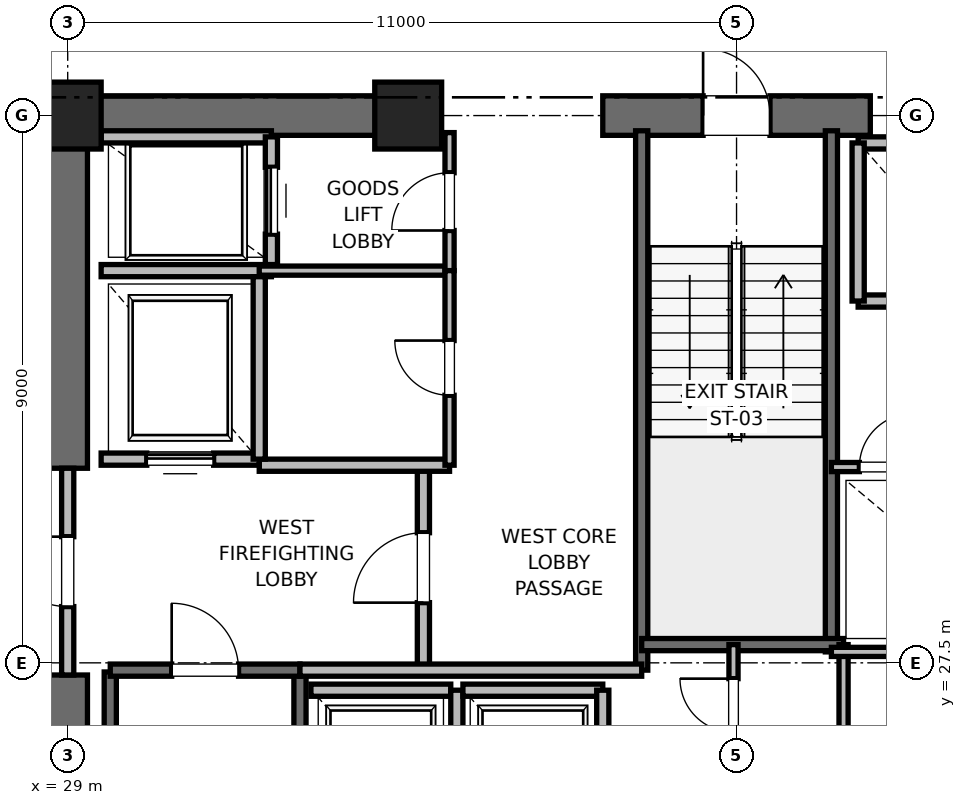
"""IFC4 building model, lengths in metres.
Left out: names, types, materials, properties, quantities, classifications, styles, units other than length and angle.
Written with IfcOpenShell. Run it as: python <this file> out.ifc"""

import sys

from ifc_helpers import new_model, si_unit, direction, frame, frame_2d, origin, origin_2d, place, context, subcontext, project, spatial, rectangle, extrude, element, fill, save


model = new_model("IFC4")
c1 = context("Model", 3, precision=1e-05, world=origin(), true_north=direction((0.0, 1.0)))
c2 = subcontext(c1, "Body", "Model", "MODEL_VIEW")
j1 = project(units=[si_unit("LENGTHUNIT", "METRE"), si_unit("PLANEANGLEUNIT", "RADIAN")], contexts=[c1])
p1 = place(None, origin())
s1 = spatial("IfcSite", under=j1, at=p1, CompositionType="ELEMENT")
p2 = place(p1, origin())
s2 = spatial("IfcBuilding", under=s1, at=p2, CompositionType="ELEMENT")
p3 = place(p2, frame((0.0, 0.0, 47.6)))
s3 = spatial("IfcBuildingStorey", under=s2, at=p3, CompositionType="ELEMENT", Elevation=47.6)
for number, where, z_axis, x_axis in (
    (1, (29.0, 36.5, 0.0), (0.0, 0.0, 1.0), (1.0, 0.0, 0.0)),
    (2, (34.6, 36.5, 0.0), (0.0, 0.0, 1.0), (1.0, 0.0, 0.0)),
):
    element("IfcColumn", number, at=place(p3, frame(where, z_axis=z_axis, x_axis=x_axis)), inside=s3, PredefinedType="PILASTER", context=c2, shape_type="SweptSolid", body=[
        extrude(rectangle(XDim=1.1, YDim=1.1, at=origin_2d()), origin(), (0.0, 0.0, 1.0), 4.0),
    ])
p4 = place(p3, frame((29.0, 36.5, 0.0), z_axis=(0.0, 0.0, 1.0), x_axis=(1.0, 0.0, 0.0)))
e3 = element("IfcWall", 3, at=p4, inside=s3, PredefinedType="SHEAR", context=c2, shape_type="SweptSolid", body=[
    extrude(rectangle(XDim=5.8, YDim=0.65, at=frame_2d((2.9, 0.0))), origin(), (0.0, 0.0, 1.0), 3.76),
])
p5 = place(p3, frame((37.8, 36.5, 0.0), z_axis=(0.0, 0.0, 1.0), x_axis=(1.0, 0.0, 0.0)))
e4 = element("IfcWall", 4, at=p5, inside=s3, PredefinedType="SHEAR", context=c2, shape_type="SweptSolid", body=[
    extrude(rectangle(XDim=4.4, YDim=0.65, at=frame_2d((2.2, 0.0))), origin(), (0.0, 0.0, 1.0), 3.76),
])
p6 = place(p5, frame((1.65, 0.0, 0.0)))
e5 = element("IfcOpeningElement", 5, at=p6, cuts=e4, PredefinedType="OPENING", context=c2, shape_type="SweptSolid", body=[
    extrude(rectangle(XDim=1.1, YDim=2.15, at=frame_2d((0.55, 1.075))), frame((0.0, 0.325, 0.0), z_axis=(0.0, -1.0, 0.0), x_axis=(1.0, 0.0, 0.0)), (0.0, 0.0, 1.0), 0.65),
])
p7 = place(p3, frame((29.0, 18.5, 0.0), z_axis=(0.0, 0.0, 1.0), x_axis=(0.0, 1.0, 0.0)))
e6 = element("IfcWall", 6, at=p7, inside=s3, PredefinedType="SHEAR", context=c2, shape_type="SweptSolid", body=[
    extrude(rectangle(XDim=8.8, YDim=0.65, at=frame_2d((4.4, 0.0))), origin(), (0.0, 0.0, 1.0), 3.76),
])
p8 = place(p3, frame((29.0, 30.7, 0.0), z_axis=(0.0, 0.0, 1.0), x_axis=(0.0, 1.0, 0.0)))
e7 = element("IfcWall", 7, at=p8, inside=s3, PredefinedType="SHEAR", context=c2, shape_type="SweptSolid", body=[
    extrude(rectangle(XDim=5.8, YDim=0.65, at=frame_2d((2.9, 0.0))), origin(), (0.0, 0.0, 1.0), 3.76),
])
p9 = place(p3, frame((29.7, 19.2, 0.0), z_axis=(0.0, 0.0, 1.0), x_axis=(0.0, 1.0, 0.0)))
e8 = element("IfcWall", 8, at=p9, inside=s3, PredefinedType="SOLIDWALL", context=c2, shape_type="SweptSolid", body=[
    extrude(rectangle(XDim=8.15, YDim=0.2, at=frame_2d((4.075, 0.0))), origin(), (0.0, 0.0, 1.0), 3.76),
])
p10 = place(p3, frame((32.82, 18.6, 0.0), z_axis=(0.0, 0.0, 1.0), x_axis=(0.0, 1.0, 0.0)))
e9 = element("IfcWall", 9, at=p10, inside=s3, PredefinedType="SOLIDWALL", context=c2, shape_type="SweptSolid", body=[
    extrude(rectangle(XDim=8.78, YDim=0.2, at=frame_2d((4.39, 0.0))), origin(), (0.0, 0.0, 1.0), 3.76),
])
p11 = place(p3, frame((29.7, 27.38, 0.0), z_axis=(0.0, 0.0, 1.0), x_axis=(1.0, 0.0, 0.0)))
e10 = element("IfcWall", 10, at=p11, inside=s3, PredefinedType="SOLIDWALL", context=c2, shape_type="SweptSolid", body=[
    extrude(rectangle(XDim=3.12, YDim=0.2, at=frame_2d((1.56, 0.0))), origin(), (0.0, 0.0, 1.0), 3.76),
])
p12 = place(p11, frame((1.01, 0.0, 0.0)))
e11 = element("IfcOpeningElement", 11, at=p12, cuts=e10, PredefinedType="OPENING", context=c2, shape_type="SweptSolid", body=[
    extrude(rectangle(XDim=1.1, YDim=2.15, at=frame_2d((0.55, 1.075))), frame((0.0, 0.1, 0.0), z_axis=(0.0, -1.0, 0.0), x_axis=(1.0, 0.0, 0.0)), (0.0, 0.0, 1.0), 0.2),
])
p13 = place(p3, frame((38.44, 27.38, 0.0), z_axis=(0.0, 0.0, 1.0), x_axis=(0.0, 1.0, 0.0)))
e12 = element("IfcWall", 12, at=p13, inside=s3, PredefinedType="SOLIDWALL", context=c2, shape_type="SweptSolid", body=[
    extrude(rectangle(XDim=8.87, YDim=0.2, at=frame_2d((4.435, 0.0))), origin(), (0.0, 0.0, 1.0), 3.76),
])
p14 = place(p3, frame((41.56, 27.68, 0.0), z_axis=(0.0, 0.0, 1.0), x_axis=(0.0, 1.0, 0.0)))
e13 = element("IfcWall", 13, at=p14, inside=s3, PredefinedType="SOLIDWALL", context=c2, shape_type="SweptSolid", body=[
    extrude(rectangle(XDim=8.57, YDim=0.2, at=frame_2d((4.285, 0.0))), origin(), (0.0, 0.0, 1.0), 3.76),
])
p15 = place(p3, frame((38.44, 27.8, 0.0), z_axis=(0.0, 0.0, 1.0), x_axis=(1.0, 0.0, 0.0)))
e14 = element("IfcWall", 14, at=p15, inside=s3, PredefinedType="SOLIDWALL", context=c2, shape_type="SweptSolid", body=[
    extrude(rectangle(XDim=3.32, YDim=0.2, at=frame_2d((1.66, 0.0))), origin(), (0.0, 0.0, 1.0), 3.76),
])
p16 = place(p3, frame((34.85, 27.38, 0.0), z_axis=(0.0, 0.0, 1.0), x_axis=(0.0, 1.0, 0.0)))
e15 = element("IfcWall", 15, at=p16, inside=s3, PredefinedType="PARTITIONING", context=c2, shape_type="SweptSolid", body=[
    extrude(rectangle(XDim=3.37, YDim=0.2, at=frame_2d((1.685, 0.0))), origin(), (0.0, 0.0, 1.0), 3.76),
])
p17 = place(p16, frame((1.11, 0.0, 0.0)))
e16 = element("IfcOpeningElement", 16, at=p17, cuts=e15, PredefinedType="OPENING", context=c2, shape_type="SweptSolid", body=[
    extrude(rectangle(XDim=1.15, YDim=2.2, at=frame_2d((0.575, 1.1))), frame((0.0, 0.1, 0.0), z_axis=(0.0, -1.0, 0.0), x_axis=(1.0, 0.0, 0.0)), (0.0, 0.0, 1.0), 0.2),
])
p18 = place(p3, frame((29.0, 27.3, 0.0), z_axis=(0.0, 0.0, 1.0), x_axis=(0.0, 1.0, 0.0)))
e17 = element("IfcWall", 17, at=p18, inside=s3, PredefinedType="PARTITIONING", context=c2, shape_type="SweptSolid", body=[
    extrude(rectangle(XDim=3.4, YDim=0.2, at=frame_2d((1.7, 0.0))), origin(), (0.0, 0.0, 1.0), 2.54),
])
p19 = place(p18, frame((1.125, 0.0, 0.0)))
e18 = element("IfcOpeningElement", 18, at=p19, cuts=e17, PredefinedType="OPENING", context=c2, shape_type="SweptSolid", body=[
    extrude(rectangle(XDim=1.15, YDim=2.2, at=frame_2d((0.575, 1.1))), frame((0.0, 0.1, 0.0), z_axis=(0.0, -1.0, 0.0), x_axis=(1.0, 0.0, 0.0)), (0.0, 0.0, 1.0), 0.2),
])
p20 = place(p3, frame((32.82, 27.38, 0.0), z_axis=(0.0, 0.0, 1.0), x_axis=(1.0, 0.0, 0.0)))
e19 = element("IfcWall", 19, at=p20, inside=s3, PredefinedType="PARTITIONING", context=c2, shape_type="SweptSolid", body=[
    extrude(rectangle(XDim=5.62, YDim=0.2, at=frame_2d((2.81, 0.0))), origin(), (0.0, 0.0, 1.0), 3.76),
])
p21 = place(p3, frame((32.15, 30.75, 0.0), z_axis=(0.0, 0.0, 1.0), x_axis=(1.0, 0.0, 0.0)))
e20 = element("IfcWall", 20, at=p21, inside=s3, PredefinedType="PARTITIONING", context=c2, shape_type="SweptSolid", body=[
    extrude(rectangle(XDim=3.13, YDim=0.2, at=frame_2d((1.565, 0.0))), origin(), (0.0, 0.0, 1.0), 3.76),
])
p22 = place(p3, frame((29.55, 30.85, 0.0), z_axis=(0.0, 0.0, 1.0), x_axis=(1.0, 0.0, 0.0)))
e21 = element("IfcWall", 21, at=p22, inside=s3, PredefinedType="SOLIDWALL", context=c2, shape_type="SweptSolid", body=[
    extrude(rectangle(XDim=2.6, YDim=0.2, at=frame_2d((1.3, 0.0))), origin(), (0.0, 0.0, 1.0), 2.54),
])
p23 = place(p22, frame((0.75, 0.0, 0.0)))
e22 = element("IfcOpeningElement", 22, at=p23, cuts=e21, PredefinedType="OPENING", context=c2, shape_type="SweptSolid", body=[
    extrude(rectangle(XDim=1.1, YDim=2.2, at=frame_2d((0.55, 1.1))), frame((0.0, 0.1, 0.0), z_axis=(0.0, -1.0, 0.0), x_axis=(1.0, 0.0, 0.0)), (0.0, 0.0, 1.0), 0.2),
])
p24 = place(p3, frame((29.55, 33.95, 0.0), z_axis=(0.0, 0.0, 1.0), x_axis=(1.0, 0.0, 0.0)))
e23 = element("IfcWall", 23, at=p24, inside=s3, PredefinedType="SOLIDWALL", context=c2, shape_type="SweptSolid", body=[
    extrude(rectangle(XDim=2.8, YDim=0.2, at=frame_2d((1.4, 0.0))), origin(), (0.0, 0.0, 1.0), 3.76),
])
p25 = place(p3, frame((32.15, 30.85, 0.0), z_axis=(0.0, 0.0, 1.0), x_axis=(0.0, 1.0, 0.0)))
e24 = element("IfcWall", 24, at=p25, inside=s3, PredefinedType="SOLIDWALL", context=c2, shape_type="SweptSolid", body=[
    extrude(rectangle(XDim=3.0, YDim=0.2, at=frame_2d((1.5, 0.0))), origin(), (0.0, 0.0, 1.0), 3.76),
])
p26 = place(p3, frame((32.35, 36.15, 0.0), z_axis=(0.0, 0.0, 1.0), x_axis=(-1.0, 0.0, 0.0)))
e25 = element("IfcWall", 25, at=p26, inside=s3, PredefinedType="SOLIDWALL", context=c2, shape_type="SweptSolid", body=[
    extrude(rectangle(XDim=2.8, YDim=0.2, at=frame_2d((1.4, 0.0))), origin(), (0.0, 0.0, 1.0), 2.889),
])
p27 = place(p3, frame((32.35, 34.05, 0.0), z_axis=(0.0, 0.0, 1.0), x_axis=(0.0, 1.0, 0.0)))
e26 = element("IfcWall", 26, at=p27, inside=s3, PredefinedType="SOLIDWALL", context=c2, shape_type="SweptSolid", body=[
    extrude(rectangle(XDim=2.1, YDim=0.2, at=frame_2d((1.05, 0.0))), origin(), (0.0, 0.0, 1.0), 3.76),
])
p28 = place(p27, frame((0.5, 0.0, 0.0)))
e27 = element("IfcOpeningElement", 27, at=p28, cuts=e26, PredefinedType="OPENING", context=c2, shape_type="SweptSolid", body=[
    extrude(rectangle(XDim=1.1, YDim=2.2, at=frame_2d((0.55, 1.1))), frame((0.0, 0.1, 0.0), z_axis=(0.0, -1.0, 0.0), x_axis=(1.0, 0.0, 0.0)), (0.0, 0.0, 1.0), 0.2),
])
p29 = place(p3, frame((35.3, 27.05, 0.0), z_axis=(0.0, 0.0, 1.0), x_axis=(-1.0, 0.0, 0.0)))
e28 = element("IfcWall", 28, at=p29, inside=s3, PredefinedType="SOLIDWALL", context=c2, shape_type="SweptSolid", body=[
    extrude(rectangle(XDim=2.3, YDim=0.2, at=frame_2d((1.15, 0.0))), origin(), (0.0, 0.0, 1.0), 3.76),
])
p30 = place(p3, frame((35.4, 24.45, 0.0), z_axis=(0.0, 0.0, 1.0), x_axis=(0.0, 1.0, 0.0)))
e29 = element("IfcWall", 29, at=p30, inside=s3, PredefinedType="SOLIDWALL", context=c2, shape_type="SweptSolid", body=[
    extrude(rectangle(XDim=2.6, YDim=0.2, at=frame_2d((1.3, 0.0))), origin(), (0.0, 0.0, 1.0), 3.76),
])
p31 = place(p3, frame((37.8, 27.05, 0.0), z_axis=(0.0, 0.0, 1.0), x_axis=(-1.0, 0.0, 0.0)))
e30 = element("IfcWall", 30, at=p31, inside=s3, PredefinedType="SOLIDWALL", context=c2, shape_type="SweptSolid", body=[
    extrude(rectangle(XDim=2.3, YDim=0.2, at=frame_2d((1.15, 0.0))), origin(), (0.0, 0.0, 1.0), 3.76),
])
p32 = place(p3, frame((37.8, 24.45, 0.0), z_axis=(0.0, 0.0, 1.0), x_axis=(0.0, 1.0, 0.0)))
e31 = element("IfcWall", 31, at=p32, inside=s3, PredefinedType="SOLIDWALL", context=c2, shape_type="SweptSolid", body=[
    extrude(rectangle(XDim=2.6, YDim=0.2, at=frame_2d((1.3, 0.0))), origin(), (0.0, 0.0, 1.0), 3.76),
])
p33 = place(p3, frame((42.0, 33.45, 0.0), z_axis=(0.0, 0.0, 1.0), x_axis=(1.0, 0.0, 0.0)))
e32 = element("IfcWall", 32, at=p33, inside=s3, PredefinedType="SOLIDWALL", context=c2, shape_type="SweptSolid", body=[
    extrude(rectangle(XDim=2.3, YDim=0.2, at=frame_2d((1.15, 0.0))), origin(), (0.0, 0.0, 1.0), 3.76),
])
p34 = place(p3, frame((44.3, 36.05, 0.0), z_axis=(0.0, 0.0, 1.0), x_axis=(-1.0, 0.0, 0.0)))
e33 = element("IfcWall", 33, at=p34, inside=s3, PredefinedType="SOLIDWALL", context=c2, shape_type="SweptSolid", body=[
    extrude(rectangle(XDim=2.3, YDim=0.2, at=frame_2d((1.15, 0.0))), origin(), (0.0, 0.0, 1.0), 2.54),
])
p35 = place(p3, frame((42.0, 36.05, 0.0), z_axis=(0.0, 0.0, 1.0), x_axis=(0.0, -1.0, 0.0)))
e34 = element("IfcWall", 34, at=p35, inside=s3, PredefinedType="SOLIDWALL", context=c2, shape_type="SweptSolid", body=[
    extrude(rectangle(XDim=2.6, YDim=0.2, at=frame_2d((1.3, 0.0))), origin(), (0.0, 0.0, 1.0), 2.54),
])
p36 = place(p3, frame((41.76, 23.8, 0.0), z_axis=(0.0, 0.0, 1.0), x_axis=(0.0, 1.0, 0.0)))
e35 = element("IfcWall", 35, at=p36, inside=s3, PredefinedType="PARTITIONING", context=c2, shape_type="SweptSolid", body=[
    extrude(rectangle(XDim=4.0, YDim=0.15, at=frame_2d((2.0, 0.0))), origin(), (0.0, 0.0, 1.0), 2.85),
])
p37 = place(p3, frame((39.95, 25.8, 0.0), z_axis=(0.0, 0.0, 1.0), x_axis=(0.0, 1.0, 0.0)))
e36 = element("IfcWall", 36, at=p37, inside=s3, PredefinedType="PARTITIONING", context=c2, shape_type="SweptSolid", body=[
    extrude(rectangle(XDim=2.0, YDim=0.15, at=frame_2d((1.0, 0.0))), origin(), (0.0, 0.0, 1.0), 2.85),
])
p38 = place(p37, frame((0.56, 0.0, 0.0)))
e37 = element("IfcOpeningElement", 37, at=p38, cuts=e36, PredefinedType="OPENING", context=c2, shape_type="SweptSolid", body=[
    extrude(rectangle(XDim=0.88, YDim=2.1, at=frame_2d((0.44, 1.05))), frame((0.0, 0.075, 0.0), z_axis=(0.0, -1.0, 0.0), x_axis=(1.0, 0.0, 0.0)), (0.0, 0.0, 1.0), 0.15),
])
p39 = place(p3, frame((32.15, 33.95, 0.0), z_axis=(0.0, 0.0, 1.0), x_axis=(1.0, 0.0, 0.0)))
e38 = element("IfcWall", 38, at=p39, inside=s3, PredefinedType="PARTITIONING", context=c2, shape_type="SweptSolid", body=[
    extrude(rectangle(XDim=3.13, YDim=0.15, at=frame_2d((1.565, 0.0))), origin(), (0.0, 0.0, 1.0), 2.85),
])
p40 = place(p3, frame((35.28, 33.95, 0.0), z_axis=(0.0, 0.0, 1.0), x_axis=(0.0, 1.0, 0.0)))
e39 = element("IfcWall", 39, at=p40, inside=s3, PredefinedType="PARTITIONING", context=c2, shape_type="SweptSolid", body=[
    extrude(rectangle(XDim=2.27, YDim=0.15, at=frame_2d((1.135, 0.0))), origin(), (0.0, 0.0, 1.0), 2.54),
])
p41 = place(p40, frame((0.66, 0.0, 0.0)))
e40 = element("IfcOpeningElement", 40, at=p41, cuts=e39, PredefinedType="OPENING", context=c2, shape_type="SweptSolid", body=[
    extrude(rectangle(XDim=0.95, YDim=2.15, at=frame_2d((0.475, 1.075))), frame((0.0, 0.075, 0.0), z_axis=(0.0, -1.0, 0.0), x_axis=(1.0, 0.0, 0.0)), (0.0, 0.0, 1.0), 0.15),
])
p42 = place(p3, frame((35.28, 30.75, 0.0), z_axis=(0.0, 0.0, 1.0), x_axis=(0.0, 1.0, 0.0)))
e41 = element("IfcWall", 41, at=p42, inside=s3, PredefinedType="PARTITIONING", context=c2, shape_type="SweptSolid", body=[
    extrude(rectangle(XDim=3.2, YDim=0.15, at=frame_2d((1.6, 0.0))), origin(), (0.0, 0.0, 1.0), 2.85),
])
p43 = place(p42, frame((1.15, 0.0, 0.0)))
e42 = element("IfcOpeningElement", 42, at=p43, cuts=e41, PredefinedType="OPENING", context=c2, shape_type="SweptSolid", body=[
    extrude(rectangle(XDim=0.9, YDim=2.1, at=frame_2d((0.45, 1.05))), frame((0.0, 0.075, 0.0), z_axis=(0.0, -1.0, 0.0), x_axis=(1.0, 0.0, 0.0)), (0.0, 0.0, 1.0), 0.15),
])
p44 = place(p3, frame((41.56, 27.68, 0.0), z_axis=(0.0, 0.0, 1.0), x_axis=(1.0, 0.0, 0.0)))
e43 = element("IfcWall", 43, at=p44, inside=s3, PredefinedType="PARTITIONING", context=c2, shape_type="SweptSolid", body=[
    extrude(rectangle(XDim=3.59, YDim=0.15, at=frame_2d((1.795, 0.0))), origin(), (0.0, 0.0, 1.0), 2.85),
])
p45 = place(p3, frame((41.56, 30.72, 0.0), z_axis=(0.0, 0.0, 1.0), x_axis=(1.0, 0.0, 0.0)))
e44 = element("IfcWall", 44, at=p45, inside=s3, PredefinedType="PARTITIONING", context=c2, shape_type="SweptSolid", body=[
    extrude(rectangle(XDim=1.8, YDim=0.15, at=frame_2d((0.9, 0.0))), origin(), (0.0, 0.0, 1.0), 2.85),
])
p46 = place(p45, frame((0.46, 0.0, 0.0)))
e45 = element("IfcOpeningElement", 45, at=p46, cuts=e44, PredefinedType="OPENING", context=c2, shape_type="SweptSolid", body=[
    extrude(rectangle(XDim=0.88, YDim=2.1, at=frame_2d((0.44, 1.05))), frame((0.0, 0.075, 0.0), z_axis=(0.0, -1.0, 0.0), x_axis=(1.0, 0.0, 0.0)), (0.0, 0.0, 1.0), 0.15),
])
p47 = place(p12, origin())
e46 = element("IfcDoor", 46, at=p47, inside=s3, OperationType="SINGLE_SWING_LEFT", PredefinedType="DOOR", context=c2, shape_type="SweptSolid", body=[
    extrude(rectangle(XDim=1.1, YDim=2.15, at=frame_2d((0.55, 1.075))), frame((0.0, 0.025, 0.0), z_axis=(0.0, -1.0, 0.0), x_axis=(1.0, 0.0, 0.0)), (0.0, 0.0, 1.0), 0.05),
])
fill(e11, e46)
p48 = place(p6, origin())
e47 = element("IfcDoor", 47, at=p48, inside=s3, OperationType="SINGLE_SWING_LEFT", PredefinedType="DOOR", context=c2, shape_type="SweptSolid", body=[
    extrude(rectangle(XDim=1.1, YDim=2.15, at=frame_2d((0.55, 1.075))), frame((0.0, 0.025, 0.0), z_axis=(0.0, -1.0, 0.0), x_axis=(1.0, 0.0, 0.0)), (0.0, 0.0, 1.0), 0.05),
])
fill(e5, e47)
p49 = place(p17, origin())
e48 = element("IfcDoor", 48, at=p49, inside=s3, OperationType="SINGLE_SWING_LEFT", PredefinedType="DOOR", context=c2, shape_type="SweptSolid", body=[
    extrude(rectangle(XDim=1.15, YDim=2.2, at=frame_2d((0.575, 1.1))), frame((0.0, 0.025, 0.0), z_axis=(0.0, -1.0, 0.0), x_axis=(1.0, 0.0, 0.0)), (0.0, 0.0, 1.0), 0.05),
])
fill(e16, e48)
p50 = place(p19, origin())
e49 = element("IfcDoor", 49, at=p50, inside=s3, OperationType="SINGLE_SWING_RIGHT", PredefinedType="DOOR", context=c2, shape_type="SweptSolid", body=[
    extrude(rectangle(XDim=1.15, YDim=2.2, at=frame_2d((0.575, 1.1))), frame((0.0, 0.025, 0.0), z_axis=(0.0, -1.0, 0.0), x_axis=(1.0, 0.0, 0.0)), (0.0, 0.0, 1.0), 0.05),
])
fill(e18, e49)
p51 = place(p23, origin())
e50 = element("IfcDoor", 50, at=p51, inside=s3, OperationType="SLIDING_TO_RIGHT", PredefinedType="DOOR", context=c2, shape_type="SweptSolid", body=[
    extrude(rectangle(XDim=1.1, YDim=2.2, at=frame_2d((0.55, 1.1))), frame((0.0, 0.025, 0.0), z_axis=(0.0, -1.0, 0.0), x_axis=(1.0, 0.0, 0.0)), (0.0, 0.0, 1.0), 0.05),
])
fill(e22, e50)
p52 = place(p28, origin())
e51 = element("IfcDoor", 51, at=p52, inside=s3, OperationType="SLIDING_TO_RIGHT", PredefinedType="DOOR", context=c2, shape_type="SweptSolid", body=[
    extrude(rectangle(XDim=1.1, YDim=2.2, at=frame_2d((0.55, 1.1))), frame((0.0, 0.025, 0.0), z_axis=(0.0, -1.0, 0.0), x_axis=(1.0, 0.0, 0.0)), (0.0, 0.0, 1.0), 0.05),
])
fill(e27, e51)
p53 = place(p38, origin())
e52 = element("IfcDoor", 52, at=p53, inside=s3, OperationType="SINGLE_SWING_RIGHT", PredefinedType="DOOR", context=c2, shape_type="SweptSolid", body=[
    extrude(rectangle(XDim=0.88, YDim=2.1, at=frame_2d((0.44, 1.05))), frame((0.0, 0.025, 0.0), z_axis=(0.0, -1.0, 0.0), x_axis=(1.0, 0.0, 0.0)), (0.0, 0.0, 1.0), 0.05),
])
fill(e37, e52)
p54 = place(p41, origin())
e53 = element("IfcDoor", 53, at=p54, inside=s3, OperationType="SINGLE_SWING_LEFT", PredefinedType="DOOR", context=c2, shape_type="SweptSolid", body=[
    extrude(rectangle(XDim=0.95, YDim=2.15, at=frame_2d((0.475, 1.075))), frame((0.0, 0.025, 0.0), z_axis=(0.0, -1.0, 0.0), x_axis=(1.0, 0.0, 0.0)), (0.0, 0.0, 1.0), 0.05),
])
fill(e40, e53)
p55 = place(p43, origin())
e54 = element("IfcDoor", 54, at=p55, inside=s3, OperationType="SINGLE_SWING_RIGHT", PredefinedType="DOOR", context=c2, shape_type="SweptSolid", body=[
    extrude(rectangle(XDim=0.9, YDim=2.1, at=frame_2d((0.45, 1.05))), frame((0.0, 0.025, 0.0), z_axis=(0.0, -1.0, 0.0), x_axis=(1.0, 0.0, 0.0)), (0.0, 0.0, 1.0), 0.05),
])
fill(e42, e54)
p56 = place(p46, origin())
e55 = element("IfcDoor", 55, at=p56, inside=s3, OperationType="SINGLE_SWING_RIGHT", PredefinedType="DOOR", context=c2, shape_type="SweptSolid", body=[
    extrude(rectangle(XDim=0.88, YDim=2.1, at=frame_2d((0.44, 1.05))), frame((0.0, 0.025, 0.0), z_axis=(0.0, -1.0, 0.0), x_axis=(1.0, 0.0, 0.0)), (0.0, 0.0, 1.0), 0.05),
])
fill(e45, e55)
save(model, sys.argv[1])
